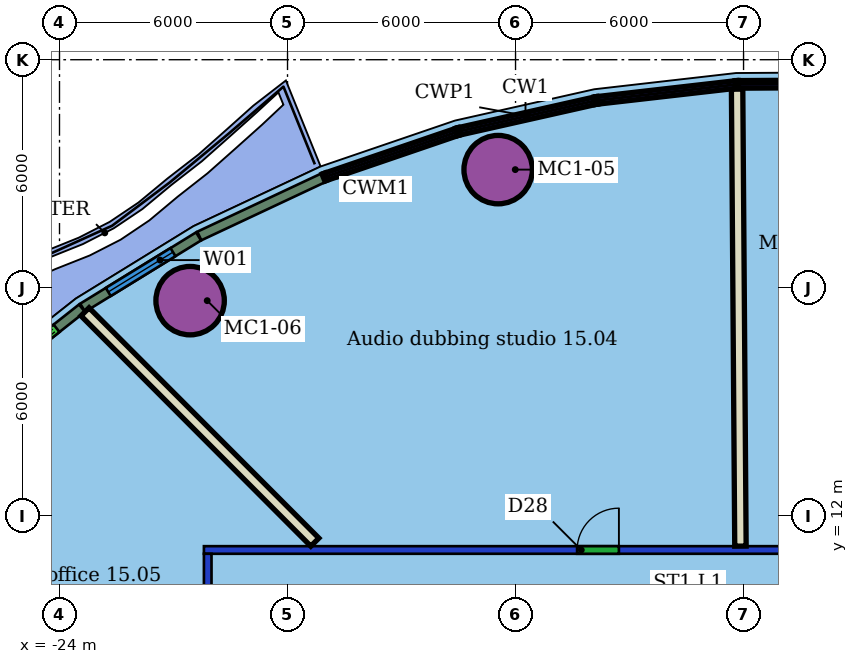
"""IFC4 building model, lengths in metres.
Left out: names, types, materials, properties, quantities, classifications, styles, units other than length and angle.
Written with IfcOpenShell. Run it as: python <this file> out.ifc"""

import sys

from ifc_helpers import new_model, si_unit, direction, frame, frame_2d, origin, origin_2d, place, context, subcontext, project, spatial, rectangle, hollow_circle, extrude, element, fill, save


model = new_model("IFC4")
c1 = context("Model", 3, precision=1e-05, world=origin(), true_north=direction((0.0, 1.0)))
c2 = subcontext(c1, "Body", "Model", "MODEL_VIEW")
j1 = project(units=[si_unit("LENGTHUNIT", "METRE"), si_unit("PLANEANGLEUNIT", "RADIAN")], contexts=[c1])
p1 = place(None, origin())
s1 = spatial("IfcSite", under=j1, at=p1, CompositionType="ELEMENT")
p2 = place(p1, origin())
s2 = spatial("IfcBuilding", under=s1, at=p2, CompositionType="ELEMENT")
p3 = place(p2, frame((0.0, 0.0, 73.0)))
s3 = spatial("IfcBuildingStorey", under=s2, at=p3, CompositionType="ELEMENT", Elevation=73.0)
for number, where, z_axis, x_axis in (
    (1, (-12.458, 21.108, 0.0), (0.0, 0.0, 1.0), (1.0, 0.0, 0.0)),
    (2, (-20.563, 17.66, 0.0), (0.0, 0.0, 1.0), (1.0, 0.0, 0.0)),
):
    element("IfcColumn", number, at=place(p3, frame(where, z_axis=z_axis, x_axis=x_axis)), inside=s3, PredefinedType="COLUMN", context=c2, shape_type="SweptSolid", body=[
        extrude(hollow_circle(Radius=0.9, WallThickness=0.06, at=origin_2d()), origin(), (0.0, 0.0, 1.0), 3.55),
    ])
p4 = place(p3, frame((-20.1, -11.0, 0.0), z_axis=(0.0, 0.0, 1.0), x_axis=(0.0, 1.0, 0.0)))
e3 = element("IfcWall", 3, at=p4, inside=s3, PredefinedType="PARTITIONING", context=c2, shape_type="SweptSolid", body=[
    extrude(rectangle(XDim=22.0, YDim=0.2, at=frame_2d((11.0, 0.0))), origin(), (0.0, 0.0, 1.0), 2.85),
])
p5 = place(p4, frame((18.354, 0.0, 0.0)))
e4 = element("IfcOpeningElement", 4, at=p5, cuts=e3, PredefinedType="OPENING", context=c2, shape_type="SweptSolid", body=[
    extrude(rectangle(XDim=1.0, YDim=2.1, at=frame_2d((0.5, 1.05))), frame((0.0, 0.11, 0.0), z_axis=(0.0, -1.0, 0.0), x_axis=(1.0, 0.0, 0.0)), (0.0, 0.0, 1.0), 0.22),
])
p6 = place(p4, frame((13.865, 0.0, 0.0)))
e5 = element("IfcOpeningElement", 5, at=p6, cuts=e3, PredefinedType="OPENING", context=c2, shape_type="SweptSolid", body=[
    extrude(rectangle(XDim=1.1, YDim=2.1, at=frame_2d((0.55, 1.05))), frame((0.0, 0.11, 0.0), z_axis=(0.0, -1.0, 0.0), x_axis=(1.0, 0.0, 0.0)), (0.0, 0.0, 1.0), 0.22),
])
p7 = place(p4, frame((5.305, 0.0, 0.0)))
e6 = element("IfcOpeningElement", 6, at=p7, cuts=e3, PredefinedType="OPENING", context=c2, shape_type="SweptSolid", body=[
    extrude(rectangle(XDim=1.0, YDim=2.1, at=frame_2d((0.5, 1.05))), frame((0.0, 0.11, 0.0), z_axis=(0.0, -1.0, 0.0), x_axis=(1.0, 0.0, 0.0)), (0.0, 0.0, 1.0), 0.22),
])
p8 = place(p3, frame((-20.2, 11.1, 0.0), z_axis=(0.0, 0.0, 1.0), x_axis=(1.0, 0.0, 0.0)))
e7 = element("IfcWall", 7, at=p8, inside=s3, PredefinedType="PARTITIONING", context=c2, shape_type="SweptSolid", body=[
    extrude(rectangle(XDim=28.4, YDim=0.2, at=frame_2d((14.2, 0.0))), origin(), (0.0, 0.0, 1.0), 2.85),
])
p9 = place(p8, frame((25.176, 0.0, 0.0)))
e8 = element("IfcOpeningElement", 8, at=p9, cuts=e7, PredefinedType="OPENING", context=c2, shape_type="SweptSolid", body=[
    extrude(rectangle(XDim=1.2, YDim=2.1, at=frame_2d((0.6, 1.05))), frame((0.0, 0.11, 0.0), z_axis=(0.0, -1.0, 0.0), x_axis=(1.0, 0.0, 0.0)), (0.0, 0.0, 1.0), 0.22),
])
p10 = place(p8, frame((19.498, 0.0, 0.0)))
e9 = element("IfcOpeningElement", 9, at=p10, cuts=e7, PredefinedType="OPENING", context=c2, shape_type="SweptSolid", body=[
    extrude(rectangle(XDim=1.0, YDim=2.1, at=frame_2d((0.5, 1.05))), frame((0.0, 0.11, 0.0), z_axis=(0.0, -1.0, 0.0), x_axis=(1.0, 0.0, 0.0)), (0.0, 0.0, 1.0), 0.22),
])
p11 = place(p8, frame((15.796, 0.0, 0.0)))
e10 = element("IfcOpeningElement", 10, at=p11, cuts=e7, PredefinedType="OPENING", context=c2, shape_type="SweptSolid", body=[
    extrude(rectangle(XDim=0.9, YDim=2.1, at=frame_2d((0.45, 1.05))), frame((0.0, 0.11, 0.0), z_axis=(0.0, -1.0, 0.0), x_axis=(1.0, 0.0, 0.0)), (0.0, 0.0, 1.0), 0.22),
])
p12 = place(p8, frame((9.82, 0.0, 0.0)))
e11 = element("IfcOpeningElement", 11, at=p12, cuts=e7, PredefinedType="OPENING", context=c2, shape_type="SweptSolid", body=[
    extrude(rectangle(XDim=1.1, YDim=2.1, at=frame_2d((0.55, 1.05))), frame((0.0, 0.11, 0.0), z_axis=(0.0, -1.0, 0.0), x_axis=(1.0, 0.0, 0.0)), (0.0, 0.0, 1.0), 0.22),
])
p13 = place(p3, frame((-6.17, 23.226, 0.0), z_axis=(0.0, 0.0, 1.0), x_axis=(0.007309152595, -0.999973287787, 0.0)))
e12 = element("IfcWall", 12, at=p13, inside=s3, PredefinedType="PARTITIONING", context=c2, shape_type="SweptSolid", body=[
    extrude(rectangle(XDim=12.025, YDim=0.3, at=frame_2d((6.012, 0.0))), origin(), (0.0, 0.0, 1.0), 3.55),
])
p14 = place(p3, frame((-23.328, 17.366, 0.0), z_axis=(0.0, 0.0, 1.0), x_axis=(0.706322145965, -0.707890546709, 0.0)))
e13 = element("IfcWall", 13, at=p14, inside=s3, PredefinedType="PARTITIONING", context=c2, shape_type="SweptSolid", body=[
    extrude(rectangle(XDim=8.562, YDim=0.3, at=frame_2d((4.281, 0.0))), origin(), (0.0, 0.0, 1.0), 3.55),
])
p15 = place(p3, frame((-30.52, 10.1, 0.0), z_axis=(0.0, 0.0, 1.0), x_axis=(0.924634361227, -0.380856006962, 0.0)))
e14 = element("IfcWall", 14, at=p15, inside=s3, PredefinedType="PARTITIONING", context=c2, shape_type="SweptSolid", body=[
    extrude(rectangle(XDim=11.099, YDim=0.3, at=frame_2d((5.55, 0.0))), origin(), (0.0, 0.0, 1.0), 3.55),
])
p16 = place(p3, frame((-17.066, 20.889, 0.0), z_axis=(0.0, 0.0, 1.0), x_axis=(-0.905219888946, -0.424943469955, 0.0)))
e15 = element("IfcWall", 15, at=p16, inside=s3, PredefinedType="SOLIDWALL", context=c2, shape_type="SweptSolid", body=[
    extrude(rectangle(XDim=3.596, YDim=0.25, at=frame_2d((1.798, 0.0))), origin(), (0.0, 0.0, 1.0), 3.15),
])
p17 = place(p3, frame((-20.341, 19.351, 0.0), z_axis=(0.0, 0.0, 1.0), x_axis=(-0.851723868461, -0.523990889132, 0.0)))
e16 = element("IfcWall", 16, at=p17, inside=s3, PredefinedType="SOLIDWALL", context=c2, shape_type="SweptSolid", body=[
    extrude(rectangle(XDim=3.58, YDim=0.25, at=frame_2d((1.79, 0.0))), origin(), (0.0, 0.0, 1.0), 3.15),
])
p18 = place(p17, frame((0.79, 0.0, 0.8)))
e17 = element("IfcOpeningElement", 17, at=p18, cuts=e16, PredefinedType="OPENING", context=c2, shape_type="SweptSolid", body=[
    extrude(rectangle(XDim=2.0, YDim=2.2, at=frame_2d((1.0, 1.1))), frame((0.0, 0.135, 0.0), z_axis=(0.0, -1.0, 0.0), x_axis=(1.0, 0.0, 0.0)), (0.0, 0.0, 1.0), 0.27),
])
p19 = place(p3, frame((-23.408, 17.462, 0.0), z_axis=(0.0, 0.0, 1.0), x_axis=(-0.784747250061, -0.619815902928, 0.0)))
e18 = element("IfcWall", 18, at=p19, inside=s3, PredefinedType="SOLIDWALL", context=c2, shape_type="SweptSolid", body=[
    extrude(rectangle(XDim=3.505, YDim=0.25, at=frame_2d((1.752, 0.0))), origin(), (0.0, 0.0, 1.0), 3.15),
])
p20 = place(p19, frame((0.853, 0.0, 0.0)))
e19 = element("IfcOpeningElement", 19, at=p20, cuts=e18, PredefinedType="OPENING", context=c2, shape_type="SweptSolid", body=[
    extrude(rectangle(XDim=1.8, YDim=2.4, at=frame_2d((0.9, 1.2))), frame((0.0, 0.135, 0.0), z_axis=(0.0, -1.0, 0.0), x_axis=(1.0, 0.0, 0.0)), (0.0, 0.0, 1.0), 0.27),
])
p21 = place(p12, origin())
e20 = element("IfcDoor", 20, at=p21, inside=s3, OperationType="SINGLE_SWING_RIGHT", PredefinedType="DOOR", context=c2, shape_type="SweptSolid", body=[
    extrude(rectangle(XDim=1.1, YDim=2.1, at=frame_2d((0.55, 1.05))), frame((0.0, 0.025, 0.0), z_axis=(0.0, -1.0, 0.0), x_axis=(1.0, 0.0, 0.0)), (0.0, 0.0, 1.0), 0.05),
])
fill(e11, e20)
p22 = place(p18, origin())
e21 = element("IfcWindow", 21, at=p22, inside=s3, PartitioningType="SINGLE_PANEL", PredefinedType="WINDOW", context=c2, shape_type="SweptSolid", body=[
    extrude(rectangle(XDim=2.0, YDim=2.2, at=frame_2d((1.0, 1.1))), frame((0.0, 0.03, 0.0), z_axis=(0.0, -1.0, 0.0), x_axis=(1.0, 0.0, 0.0)), (0.0, 0.0, 1.0), 0.06),
])
fill(e17, e21)
p23 = place(p20, origin())
e22 = element("IfcDoor", 22, at=p23, inside=s3, OperationType="DOUBLE_DOOR_SLIDING", PredefinedType="DOOR", context=c2, shape_type="SweptSolid", body=[
    extrude(rectangle(XDim=1.8, YDim=2.4, at=frame_2d((0.9, 1.2))), frame((0.0, 0.025, 0.0), z_axis=(0.0, -1.0, 0.0), x_axis=(1.0, 0.0, 0.0)), (0.0, 0.0, 1.0), 0.05),
])
fill(e19, e22)
save(model, sys.argv[1])
